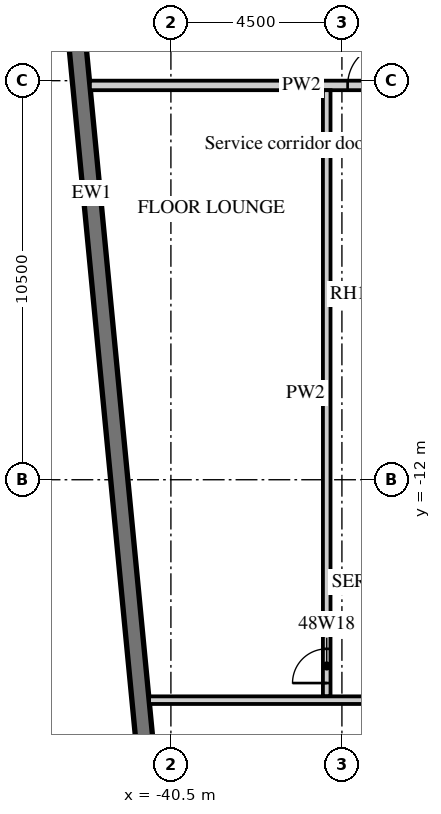
"""IFC4 building model, lengths in metres.
Left out: names, types, materials, properties, quantities, classifications, styles, units other than length and angle.
Written with IfcOpenShell. Run it as: python <this file> out.ifc"""

import sys

from ifc_helpers import new_model, si_unit, direction, frame, frame_2d, origin, place, context, subcontext, project, spatial, rectangle, extrude, element, fill, save


model = new_model("IFC4")
c1 = context("Model", 3, precision=1e-05, world=origin(), true_north=direction((0.0, 1.0)))
c2 = subcontext(c1, "Body", "Model", "MODEL_VIEW")
j1 = project(units=[si_unit("LENGTHUNIT", "METRE"), si_unit("PLANEANGLEUNIT", "RADIAN")], contexts=[c1])
p1 = place(None, origin())
s1 = spatial("IfcSite", under=j1, at=p1, CompositionType="ELEMENT")
p2 = place(p1, origin())
s2 = spatial("IfcBuilding", under=s1, at=p2, CompositionType="ELEMENT")
p3 = place(p2, frame((0.0, 0.0, 199.9)))
s3 = spatial("IfcBuildingStorey", under=s2, at=p3, CompositionType="ELEMENT", Elevation=199.9)
p4 = place(p3, frame((-44.214, 12.466, 0.0), z_axis=(0.0, 0.0, 1.0), x_axis=(0.095847314626, -0.995396047952, 0.0)))
e1 = element("IfcWall", 1, at=p4, inside=s3, PredefinedType="SOLIDWALL", context=c2, shape_type="SweptSolid", body=[
    extrude(rectangle(XDim=34.0, YDim=0.45, at=frame_2d((17.0, 0.0))), origin(), (0.0, 0.0, 1.0), 3.02),
])
p5 = place(p4, frame((2.865, 0.0, 0.45)))
e2 = element("IfcOpeningElement", 2, at=p5, cuts=e1, PredefinedType="OPENING", context=c2, shape_type="SweptSolid", body=[
    extrude(rectangle(XDim=3.3, YDim=2.25, at=frame_2d((1.65, 1.125))), frame((0.0, 0.235, 0.0), z_axis=(0.0, -1.0, 0.0), x_axis=(1.0, 0.0, 0.0)), (0.0, 0.0, 1.0), 0.47),
])
p6 = place(p4, frame((7.386, 0.0, 0.45)))
e3 = element("IfcOpeningElement", 3, at=p6, cuts=e1, PredefinedType="OPENING", context=c2, shape_type="SweptSolid", body=[
    extrude(rectangle(XDim=3.3, YDim=2.25, at=frame_2d((1.65, 1.125))), frame((0.0, 0.235, 0.0), z_axis=(0.0, -1.0, 0.0), x_axis=(1.0, 0.0, 0.0)), (0.0, 0.0, 1.0), 0.47),
])
p7 = place(p3, frame((-42.632, -1.625, 0.0), z_axis=(0.0, 0.0, 1.0), x_axis=(1.0, 0.0, 0.0)))
e4 = element("IfcWall", 4, at=p7, inside=s3, PredefinedType="PARTITIONING", context=c2, shape_type="SweptSolid", body=[
    extrude(rectangle(XDim=11.132, YDim=0.25, at=frame_2d((5.566, 0.0))), origin(), (0.0, 0.0, 1.0), 3.02),
])
p8 = place(p7, frame((9.207, 0.0, 0.0)))
e5 = element("IfcOpeningElement", 5, at=p8, cuts=e4, PredefinedType="OPENING", context=c2, shape_type="SweptSolid", body=[
    extrude(rectangle(XDim=1.3, YDim=2.1, at=frame_2d((0.65, 1.05))), frame((0.0, 0.135, 0.0), z_axis=(0.0, -1.0, 0.0), x_axis=(1.0, 0.0, 0.0)), (0.0, 0.0, 1.0), 0.27),
])
p9 = place(p7, frame((6.781, 0.0, 0.0)))
e6 = element("IfcOpeningElement", 6, at=p9, cuts=e4, PredefinedType="OPENING", context=c2, shape_type="SweptSolid", body=[
    extrude(rectangle(XDim=1.1, YDim=2.1, at=frame_2d((0.55, 1.05))), frame((0.0, 0.135, 0.0), z_axis=(0.0, -1.0, 0.0), x_axis=(1.0, 0.0, 0.0)), (0.0, 0.0, 1.0), 0.27),
])
p10 = place(p3, frame((-36.4, -17.7, 0.0), z_axis=(0.0, 0.0, 1.0), x_axis=(0.0, 1.0, 0.0)))
e7 = element("IfcWall", 7, at=p10, inside=s3, PredefinedType="PARTITIONING", context=c2, shape_type="SweptSolid", body=[
    extrude(rectangle(XDim=15.95, YDim=0.2, at=frame_2d((7.975, 0.0))), origin(), (0.0, 0.0, 1.0), 3.02),
])
p11 = place(p10, frame((0.35, 0.0, 0.0)))
e8 = element("IfcOpeningElement", 8, at=p11, cuts=e7, PredefinedType="OPENING", context=c2, shape_type="SweptSolid", body=[
    extrude(rectangle(XDim=0.9, YDim=2.1, at=frame_2d((0.45, 1.05))), frame((0.0, 0.11, 0.0), z_axis=(0.0, -1.0, 0.0), x_axis=(1.0, 0.0, 0.0)), (0.0, 0.0, 1.0), 0.22),
])
p12 = place(p3, frame((-41.074, -17.8, 0.0), z_axis=(0.0, 0.0, 1.0), x_axis=(1.0, 0.0, 0.0)))
e9 = element("IfcWall", 9, at=p12, inside=s3, PredefinedType="PARTITIONING", context=c2, shape_type="SweptSolid", body=[
    extrude(rectangle(XDim=27.474, YDim=0.2, at=frame_2d((13.737, 0.0))), origin(), (0.0, 0.0, 1.0), 3.02),
])
p13 = place(p12, frame((9.962, 0.0, 0.0)))
e10 = element("IfcOpeningElement", 10, at=p13, cuts=e9, PredefinedType="OPENING", context=c2, shape_type="SweptSolid", body=[
    extrude(rectangle(XDim=0.9, YDim=2.1, at=frame_2d((0.45, 1.05))), frame((0.0, 0.11, 0.0), z_axis=(0.0, -1.0, 0.0), x_axis=(1.0, 0.0, 0.0)), (0.0, 0.0, 1.0), 0.22),
])
p14 = place(p12, frame((18.262, 0.0, 0.0)))
e11 = element("IfcOpeningElement", 11, at=p14, cuts=e9, PredefinedType="OPENING", context=c2, shape_type="SweptSolid", body=[
    extrude(rectangle(XDim=0.9, YDim=2.1, at=frame_2d((0.45, 1.05))), frame((0.0, 0.11, 0.0), z_axis=(0.0, -1.0, 0.0), x_axis=(1.0, 0.0, 0.0)), (0.0, 0.0, 1.0), 0.22),
])
p15 = place(p9, origin())
e12 = element("IfcDoor", 12, at=p15, inside=s3, OperationType="SINGLE_SWING_RIGHT", PredefinedType="DOOR", context=c2, shape_type="SweptSolid", body=[
    extrude(rectangle(XDim=1.1, YDim=2.1, at=frame_2d((0.55, 1.05))), frame((0.0, 0.025, 0.0), z_axis=(0.0, -1.0, 0.0), x_axis=(1.0, 0.0, 0.0)), (0.0, 0.0, 1.0), 0.05),
])
fill(e6, e12)
p16 = place(p11, origin())
e13 = element("IfcDoor", 13, at=p16, inside=s3, OperationType="SINGLE_SWING_LEFT", PredefinedType="DOOR", context=c2, shape_type="SweptSolid", body=[
    extrude(rectangle(XDim=0.9, YDim=2.1, at=frame_2d((0.45, 1.05))), frame((0.0, 0.025, 0.0), z_axis=(0.0, -1.0, 0.0), x_axis=(1.0, 0.0, 0.0)), (0.0, 0.0, 1.0), 0.05),
])
fill(e8, e13)
save(model, sys.argv[1])
